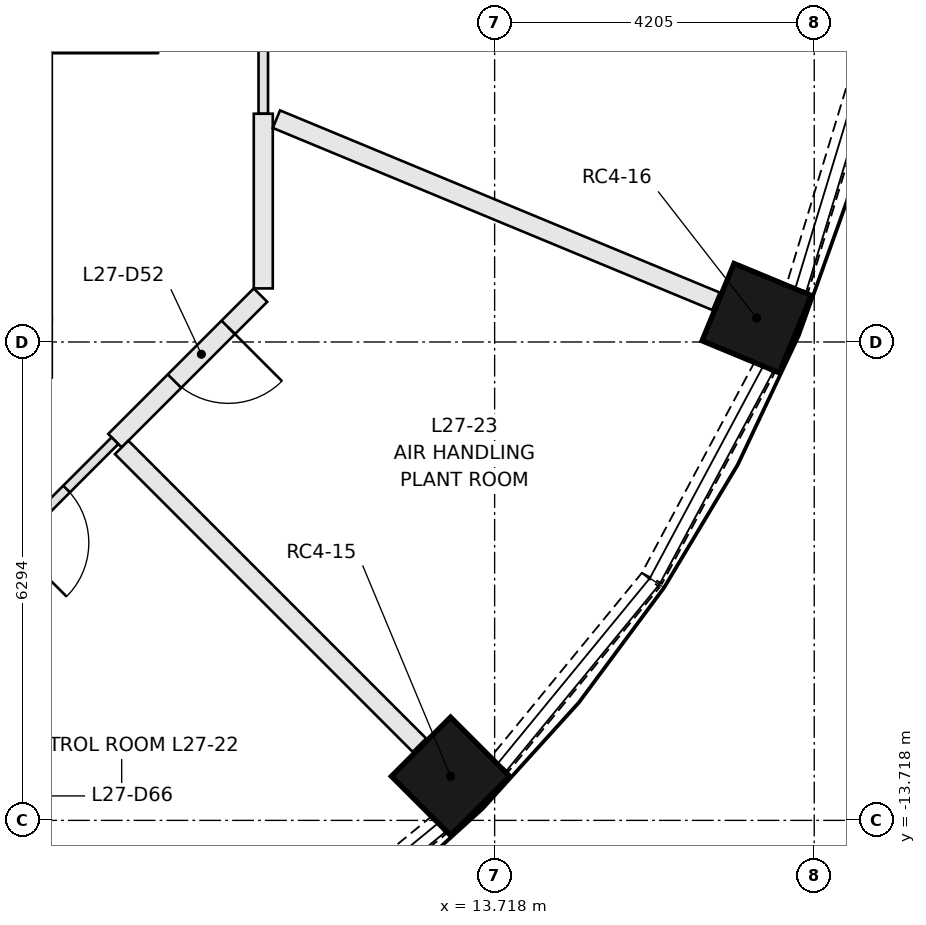
"""IFC4 building model, lengths in metres.
Left out: names, types, materials, properties, quantities, classifications, styles, units other than length and angle.
Written with IfcOpenShell. Run it as: python <this file> out.ifc"""

import sys

from ifc_helpers import new_model, si_unit, direction, frame, frame_2d, origin, origin_2d, place, context, subcontext, project, spatial, rectangle, extrude, element, fill, save


model = new_model("IFC4")
c1 = context("Model", 3, precision=1e-05, world=origin(), true_north=direction((0.0, 1.0)))
c2 = subcontext(c1, "Body", "Model", "MODEL_VIEW")
j1 = project(units=[si_unit("LENGTHUNIT", "METRE"), si_unit("PLANEANGLEUNIT", "RADIAN")], contexts=[c1])
p1 = place(None, origin())
s1 = spatial("IfcSite", under=j1, at=p1, CompositionType="ELEMENT")
p2 = place(p1, origin())
s2 = spatial("IfcBuilding", under=s1, at=p2, CompositionType="ELEMENT")
p3 = place(p2, frame((0.0, 0.0, 105.6)))
s3 = spatial("IfcBuildingStorey", under=s2, at=p3, CompositionType="ELEMENT", Elevation=105.6)
for number, where, z_axis, x_axis in (
    (1, (13.138, -13.138, 0.0), (0.0, 0.0, 1.0), (0.707, -0.707, 0.0)),
    (2, (17.166, -7.11, 0.0), (0.0, 0.0, 1.0), (0.924, -0.383, 0.0)),
):
    element("IfcColumn", number, at=place(p3, frame(where, z_axis=z_axis, x_axis=x_axis)), inside=s3, PredefinedType="COLUMN", context=c2, shape_type="SweptSolid", body=[
        extrude(rectangle(XDim=1.1, YDim=1.1, at=origin_2d()), origin(), (0.0, 0.0, 1.0), 3.65),
    ])
for number, where, z_axis, x_axis in (
    (3, (10.557, -15.771, 0.0), (0.0, 0.0, 1.0), (0.773, 0.634, 0.0)),
    (4, (13.781, -12.983, 0.0), (0.0, 0.0, 1.0), (0.634, 0.773, 0.0)),
):
    element("IfcWall", number, at=place(p3, frame(where, z_axis=z_axis, x_axis=x_axis)), inside=s3, PredefinedType="SOLIDWALL", context=c2, shape_type="SweptSolid", body=[
        extrude(rectangle(XDim=3.139, YDim=0.3, at=frame_2d((1.569, 0.0))), origin(), (0.0, 0.0, 1.0), 0.9),
    ])
p4 = place(p3, frame((15.788, -10.532, 0.0), z_axis=(0.0, 0.0, 1.0), x_axis=(0.471375185282, 0.88193278355, 0.0)))
e5 = element("IfcWall", 5, at=p4, inside=s3, PredefinedType="SOLIDWALL", context=c2, shape_type="SweptSolid", body=[
    extrude(rectangle(XDim=3.139, YDim=0.3, at=frame_2d((1.57, 0.0))), origin(), (0.0, 0.0, 1.0), 0.9),
])
p5 = place(p3, frame((17.699, -6.722, 0.0), z_axis=(0.0, 0.0, 1.0), x_axis=(0.290214584271, 0.956961595403, 0.0)))
e6 = element("IfcWall", 6, at=p5, inside=s3, PredefinedType="SOLIDWALL", context=c2, shape_type="SweptSolid", body=[
    extrude(rectangle(XDim=3.139, YDim=0.3, at=frame_2d((1.57, 0.0))), origin(), (0.0, 0.0, 1.0), 0.9),
])
p6 = place(p3, frame((10.674, 4.421, 0.0), z_axis=(0.0, 0.0, 1.0), x_axis=(0.0, -1.0, 0.0)))
e7 = element("IfcWall", 7, at=p6, inside=s3, PredefinedType="PARTITIONING", context=c2, shape_type="SweptSolid", body=[
    extrude(rectangle(XDim=8.843, YDim=0.125, at=frame_2d((4.421, 0.0))), origin(), (0.0, 0.0, 1.0), 3.3),
])
p7 = place(p6, frame((3.5, 0.0, 0.0)))
e8 = element("IfcOpeningElement", 8, at=p7, cuts=e7, PredefinedType="OPENING", context=c2, shape_type="SweptSolid", body=[
    extrude(rectangle(XDim=1.8, YDim=2.1, at=frame_2d((0.9, 1.05))), frame((0.0, 0.073, 0.0), z_axis=(0.0, -1.0, 0.0), x_axis=(1.0, 0.0, 0.0)), (0.0, 0.0, 1.0), 0.145),
])
p8 = place(p3, frame((10.637, -6.808, 0.0), z_axis=(0.0, 0.0, 1.0), x_axis=(-0.707151855722, -0.707061703777, 0.0)))
e9 = element("IfcWall", 9, at=p8, inside=s3, PredefinedType="PARTITIONING", context=c2, shape_type="SweptSolid", body=[
    extrude(rectangle(XDim=2.708, YDim=0.25, at=frame_2d((1.354, 0.0))), origin(), (0.0, 0.0, 1.0), 3.3),
])
p9 = place(p8, frame((0.6, 0.0, 0.0)))
e10 = element("IfcOpeningElement", 10, at=p9, cuts=e9, PredefinedType="OPENING", context=c2, shape_type="SweptSolid", body=[
    extrude(rectangle(XDim=1.0, YDim=2.1, at=frame_2d((0.5, 1.05))), frame((0.0, 0.135, 0.0), z_axis=(0.0, -1.0, 0.0), x_axis=(1.0, 0.0, 0.0)), (0.0, 0.0, 1.0), 0.27),
])
p10 = place(p3, frame((10.674, -4.421, 0.0), z_axis=(0.0, 0.0, 1.0), x_axis=(0.0, -1.0, 0.0)))
e11 = element("IfcWall", 11, at=p10, inside=s3, PredefinedType="PARTITIONING", context=c2, shape_type="SweptSolid", body=[
    extrude(rectangle(XDim=2.298, YDim=0.25, at=frame_2d((1.149, 0.0))), origin(), (0.0, 0.0, 1.0), 3.3),
])
p11 = place(p3, frame((8.722, -8.722, 0.0), z_axis=(0.0, 0.0, 1.0), x_axis=(-0.707062130741, -0.707151428813, 0.0)))
e12 = element("IfcWall", 12, at=p11, inside=s3, PredefinedType="PARTITIONING", context=c2, shape_type="SweptSolid", body=[
    extrude(rectangle(XDim=2.734, YDim=0.125, at=frame_2d((1.367, 0.0))), origin(), (0.0, 0.0, 1.0), 3.3),
])
p12 = place(p11, frame((0.9, 0.0, 0.0)))
e13 = element("IfcOpeningElement", 13, at=p12, cuts=e12, PredefinedType="OPENING", context=c2, shape_type="SweptSolid", body=[
    extrude(rectangle(XDim=1.0, YDim=2.1, at=frame_2d((0.5, 1.05))), frame((0.0, 0.073, 0.0), z_axis=(0.0, -1.0, 0.0), x_axis=(1.0, 0.0, 0.0)), (0.0, 0.0, 1.0), 0.145),
])
p13 = place(p3, frame((16.63, -6.888, 0.0), z_axis=(0.0, 0.0, 1.0), x_axis=(-0.923891816603, 0.382653774599, 0.0)))
e14 = element("IfcWall", 14, at=p13, inside=s3, PredefinedType="PARTITIONING", context=c2, shape_type="SweptSolid", body=[
    extrude(rectangle(XDim=6.26, YDim=0.25, at=frame_2d((3.13, 0.0))), origin(), (0.0, 0.0, 1.0), 3.3),
])
p14 = place(p3, frame((8.811, -8.811, 0.0), z_axis=(0.0, 0.0, 1.0), x_axis=(0.707106781187, -0.707106781187, 0.0)))
e15 = element("IfcWall", 15, at=p14, inside=s3, PredefinedType="PARTITIONING", context=c2, shape_type="SweptSolid", body=[
    extrude(rectangle(XDim=5.54, YDim=0.25, at=frame_2d((2.77, 0.0))), origin(), (0.0, 0.0, 1.0), 3.3),
])
p15 = place(p9, origin())
e16 = element("IfcDoor", 16, at=p15, inside=s3, OperationType="SINGLE_SWING_LEFT", PredefinedType="DOOR", context=c2, shape_type="SweptSolid", body=[
    extrude(rectangle(XDim=1.0, YDim=2.1, at=frame_2d((0.5, 1.05))), frame((0.0, 0.025, 0.0), z_axis=(0.0, -1.0, 0.0), x_axis=(1.0, 0.0, 0.0)), (0.0, 0.0, 1.0), 0.05),
])
fill(e10, e16)
p16 = place(p12, origin())
e17 = element("IfcDoor", 17, at=p16, inside=s3, OperationType="SINGLE_SWING_RIGHT", PredefinedType="DOOR", context=c2, shape_type="SweptSolid", body=[
    extrude(rectangle(XDim=1.0, YDim=2.1, at=frame_2d((0.5, 1.05))), frame((0.0, 0.025, 0.0), z_axis=(0.0, -1.0, 0.0), x_axis=(1.0, 0.0, 0.0)), (0.0, 0.0, 1.0), 0.05),
])
fill(e13, e17)
save(model, sys.argv[1])
